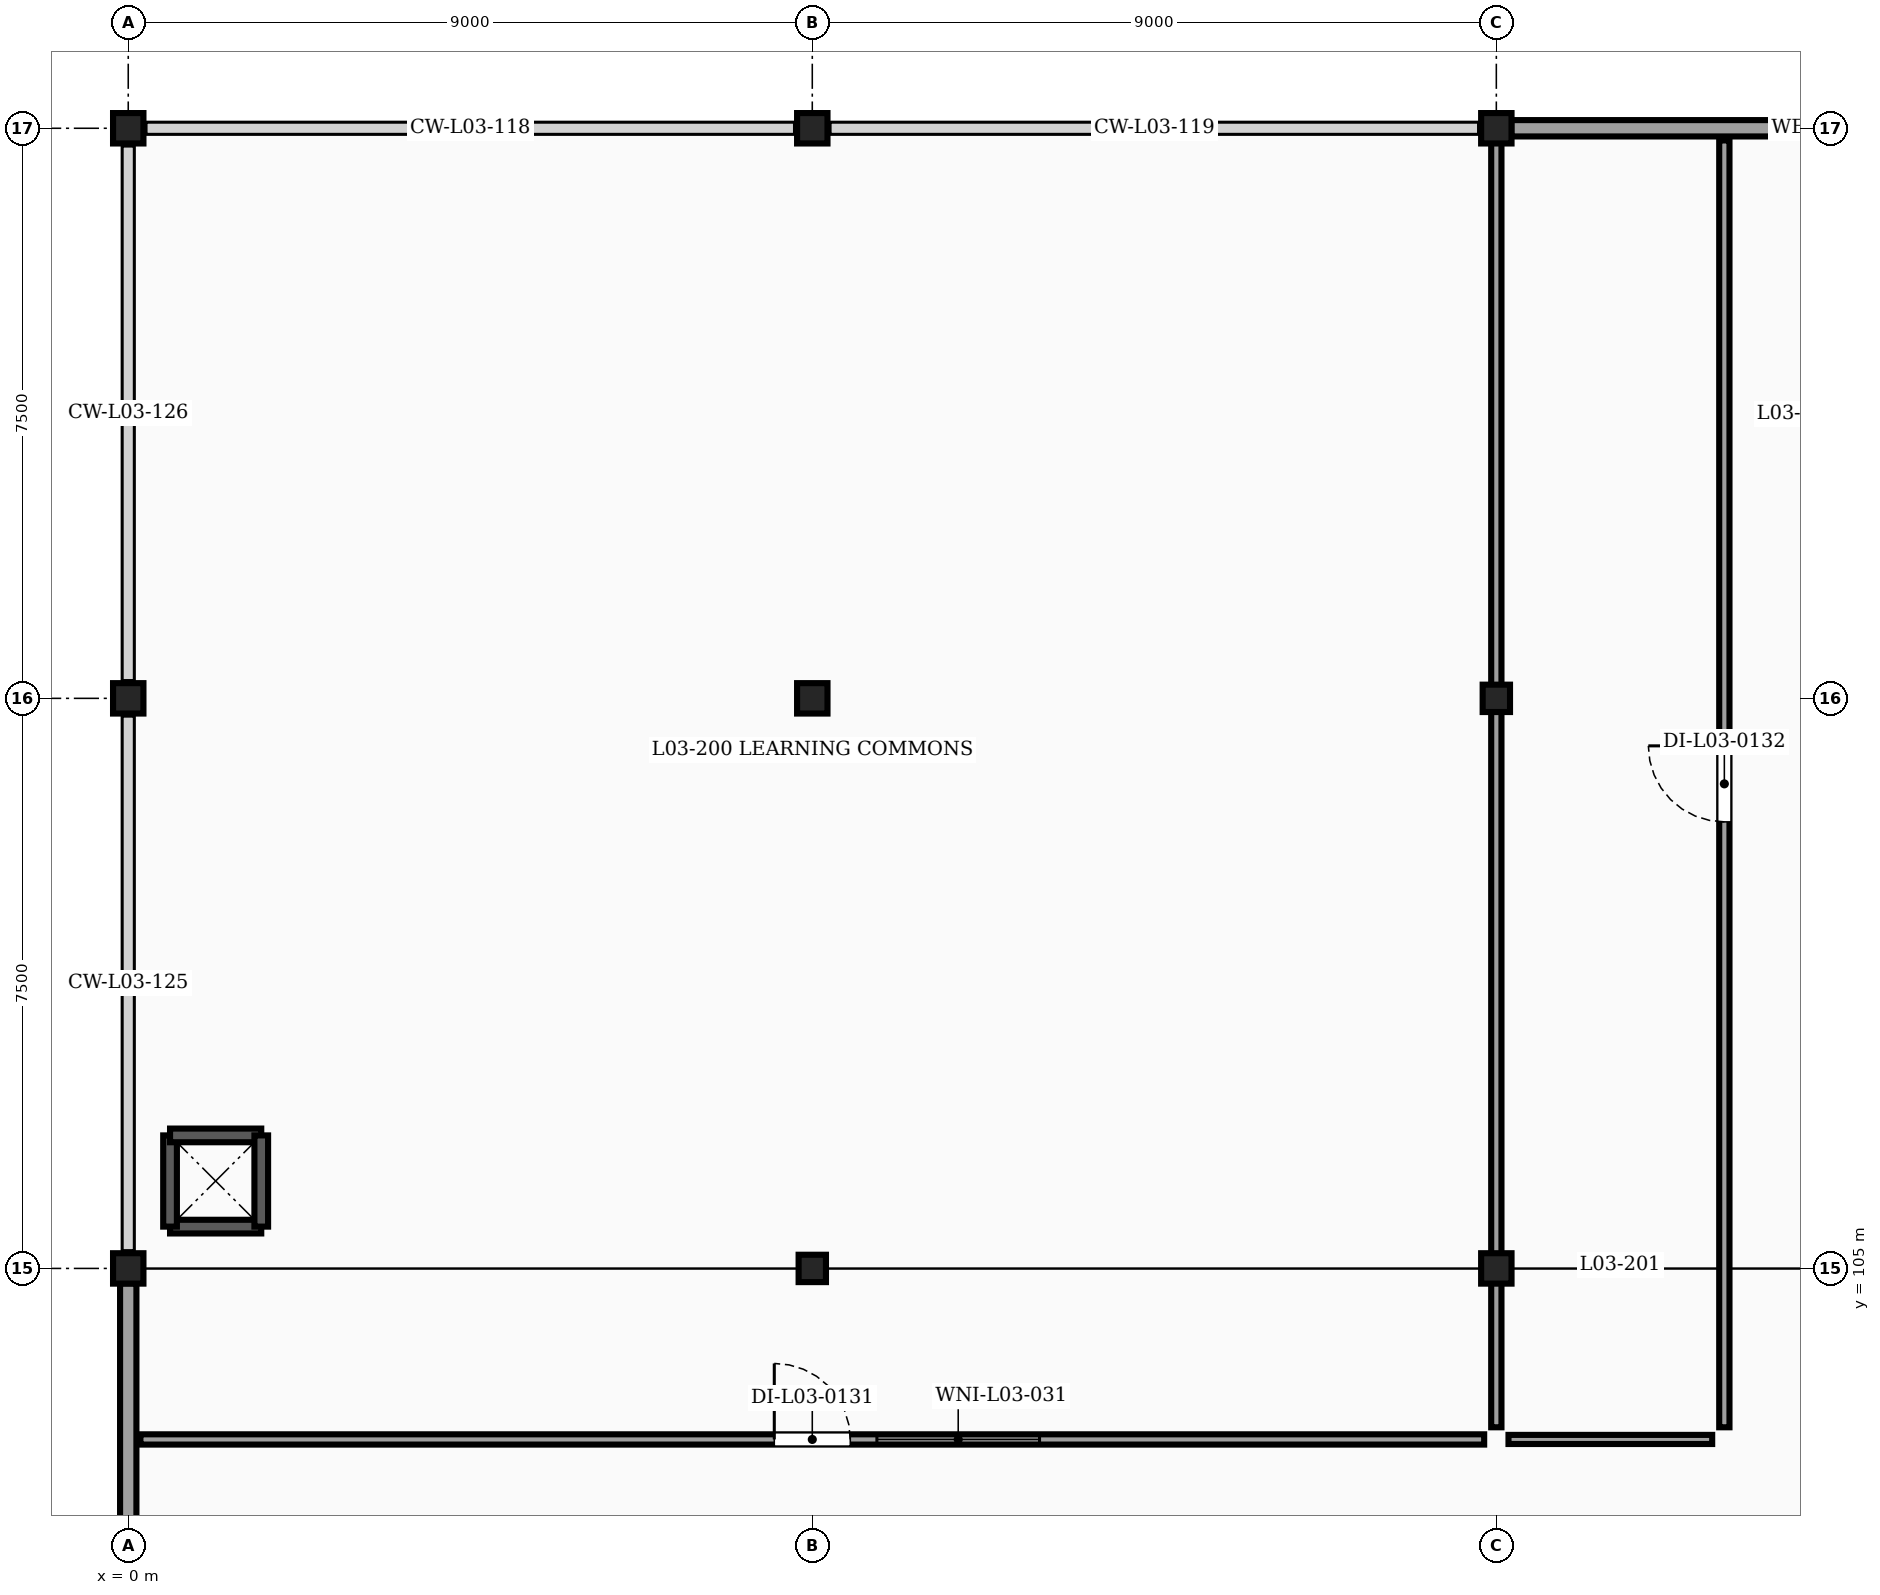
"""IFC4 building model, lengths in metres.
Left out: names, types, materials, properties, quantities, classifications, styles, units other than length and angle.
Written with IfcOpenShell. Run it as: python <this file> out.ifc"""

import sys

from ifc_helpers import new_model, si_unit, direction, frame, frame_2d, origin, origin_2d, place, context, subcontext, project, spatial, rectangle, extrude, element, fill, save


model = new_model("IFC4")
c1 = context("Model", 3, precision=1e-05, world=origin(), true_north=direction((0.0, 1.0)))
c2 = subcontext(c1, "Body", "Model", "MODEL_VIEW")
j1 = project(units=[si_unit("LENGTHUNIT", "METRE"), si_unit("PLANEANGLEUNIT", "RADIAN")], contexts=[c1])
p1 = place(None, origin())
s1 = spatial("IfcSite", under=j1, at=p1, CompositionType="ELEMENT")
p2 = place(p1, origin())
s2 = spatial("IfcBuilding", under=s1, at=p2, CompositionType="ELEMENT")
p3 = place(p2, frame((0.0, 0.0, 12.3)))
s3 = spatial("IfcBuildingStorey", under=s2, at=p3, CompositionType="ELEMENT", Elevation=12.3)
p4 = place(p3, frame((0.0, 105.0, 0.0), z_axis=(0.0, 0.0, 1.0), x_axis=(1.0, 0.0, 0.0)))
e1 = element("IfcColumn", 1, at=p4, inside=s3, PredefinedType="COLUMN", context=c2, shape_type="SweptSolid", body=[
    extrude(rectangle(XDim=0.4, YDim=0.4, at=origin_2d()), origin(), (0.0, 0.0, 1.0), 3.65),
])
p5 = place(p3, frame((9.0, 105.0, 0.0), z_axis=(0.0, 0.0, 1.0), x_axis=(1.0, 0.0, 0.0)))
e2 = element("IfcColumn", 2, at=p5, inside=s3, PredefinedType="COLUMN", context=c2, shape_type="SweptSolid", body=[
    extrude(rectangle(XDim=0.36, YDim=0.36, at=origin_2d()), origin(), (0.0, 0.0, 1.0), 3.65),
])
for number, where, z_axis, x_axis in (
    (3, (18.0, 105.0, 0.0), (0.0, 0.0, 1.0), (1.0, 0.0, 0.0)),
    (4, (0.0, 112.5, 0.0), (0.0, 0.0, 1.0), (1.0, 0.0, 0.0)),
    (5, (9.0, 112.5, 0.0), (0.0, 0.0, 1.0), (1.0, 0.0, 0.0)),
):
    element("IfcColumn", number, at=place(p3, frame(where, z_axis=z_axis, x_axis=x_axis)), inside=s3, PredefinedType="COLUMN", context=c2, shape_type="SweptSolid", body=[
        extrude(rectangle(XDim=0.4, YDim=0.4, at=origin_2d()), origin(), (0.0, 0.0, 1.0), 3.65),
    ])
p6 = place(p3, frame((18.0, 112.5, 0.0), z_axis=(0.0, 0.0, 1.0), x_axis=(1.0, 0.0, 0.0)))
e6 = element("IfcColumn", 6, at=p6, inside=s3, PredefinedType="COLUMN", context=c2, shape_type="SweptSolid", body=[
    extrude(rectangle(XDim=0.36, YDim=0.36, at=origin_2d()), origin(), (0.0, 0.0, 1.0), 3.65),
])
for number, where, z_axis, x_axis in (
    (7, (0.0, 120.0, 0.0), (0.0, 0.0, 1.0), (1.0, 0.0, 0.0)),
    (8, (9.0, 120.0, 0.0), (0.0, 0.0, 1.0), (1.0, 0.0, 0.0)),
    (9, (18.0, 120.0, 0.0), (0.0, 0.0, 1.0), (1.0, 0.0, 0.0)),
):
    element("IfcColumn", number, at=place(p3, frame(where, z_axis=z_axis, x_axis=x_axis)), inside=s3, PredefinedType="COLUMN", context=c2, shape_type="SweptSolid", body=[
        extrude(rectangle(XDim=0.4, YDim=0.4, at=origin_2d()), origin(), (0.0, 0.0, 1.0), 3.65),
    ])
p7 = place(p3, frame((18.196, 120.0, 0.0), z_axis=(0.0, 0.0, 1.0), x_axis=(1.0, 0.0, 0.0)))
e10 = element("IfcWall", 10, at=p7, inside=s3, PredefinedType="SOLIDWALL", context=c2, shape_type="SweptSolid", body=[
    extrude(rectangle(XDim=8.608, YDim=0.215, at=frame_2d((4.304, 0.0))), origin(), (0.0, 0.0, 1.0), 3.057),
])
p8 = place(p3, frame((0.0, 97.696, 0.0), z_axis=(0.0, 0.0, 1.0), x_axis=(0.0, 1.0, 0.0)))
e11 = element("IfcWall", 11, at=p8, inside=s3, PredefinedType="SOLIDWALL", context=c2, shape_type="SweptSolid", body=[
    extrude(rectangle(XDim=7.108, YDim=0.215, at=frame_2d((3.554, 0.0))), origin(), (0.0, 0.0, 1.0), 3.057),
])
for number, where, z_axis, x_axis in (
    (12, (1.75, 105.55, 0.0), (0.0, 0.0, 1.0), (-1.0, 0.0, 0.0)),
    (13, (0.55, 105.55, 0.0), (0.0, 0.0, 1.0), (0.0, 1.0, 0.0)),
    (14, (0.55, 106.75, 0.0), (0.0, 0.0, 1.0), (1.0, 0.0, 0.0)),
    (15, (1.75, 106.75, 0.0), (0.0, 0.0, 1.0), (0.0, -1.0, 0.0)),
):
    element("IfcWall", number, at=place(p3, frame(where, z_axis=z_axis, x_axis=x_axis)), inside=s3, PredefinedType="SHEAR", context=c2, shape_type="SweptSolid", body=[
        extrude(rectangle(XDim=1.2, YDim=0.18, at=frame_2d((0.6, 0.0))), origin(), (0.0, 0.0, 1.0), 3.65),
    ])
p9 = place(p3, frame((0.16, 102.75, 0.0), z_axis=(0.0, 0.0, 1.0), x_axis=(1.0, 0.0, 0.0)))
e16 = element("IfcWall", 16, at=p9, inside=s3, PredefinedType="PARTITIONING", context=c2, shape_type="SweptSolid", body=[
    extrude(rectangle(XDim=17.68, YDim=0.135, at=frame_2d((8.84, 0.0))), origin(), (0.0, 0.0, 1.0), 3.65),
])
p10 = place(p9, frame((8.34, 0.0, 0.0)))
e17 = element("IfcOpeningElement", 17, at=p10, cuts=e16, PredefinedType="OPENING", context=c2, shape_type="SweptSolid", body=[
    extrude(rectangle(XDim=1.0, YDim=2.15, at=frame_2d((0.5, 1.075))), frame((0.0, 0.077, 0.0), z_axis=(0.0, -1.0, 0.0), x_axis=(1.0, 0.0, 0.0)), (0.0, 0.0, 1.0), 0.155),
])
p11 = place(p9, frame((9.69, 0.0, 1.02)))
e18 = element("IfcOpeningElement", 18, at=p11, cuts=e16, PredefinedType="OPENING", context=c2, shape_type="SweptSolid", body=[
    extrude(rectangle(XDim=2.14, YDim=1.22, at=frame_2d((1.07, 0.61))), frame((0.0, 0.077, 0.0), z_axis=(0.0, -1.0, 0.0), x_axis=(1.0, 0.0, 0.0)), (0.0, 0.0, 1.0), 0.155),
])
p12 = place(p3, frame((18.16, 102.75, 0.0), z_axis=(0.0, 0.0, 1.0), x_axis=(1.0, 0.0, 0.0)))
e19 = element("IfcWall", 19, at=p12, inside=s3, PredefinedType="PARTITIONING", context=c2, shape_type="SweptSolid", body=[
    extrude(rectangle(XDim=2.68, YDim=0.12, at=frame_2d((1.34, 0.0))), origin(), (0.0, 0.0, 1.0), 3.65),
])
p13 = place(p3, frame((21.0, 102.91, 0.0), z_axis=(0.0, 0.0, 1.0), x_axis=(0.0, 1.0, 0.0)))
e20 = element("IfcWall", 20, at=p13, inside=s3, PredefinedType="PARTITIONING", context=c2, shape_type="SweptSolid", body=[
    extrude(rectangle(XDim=16.93, YDim=0.135, at=frame_2d((8.465, 0.0))), origin(), (0.0, 0.0, 1.0), 3.342),
])
p14 = place(p13, frame((7.965, 0.0, 0.0)))
e21 = element("IfcOpeningElement", 21, at=p14, cuts=e20, PredefinedType="OPENING", context=c2, shape_type="SweptSolid", body=[
    extrude(rectangle(XDim=1.0, YDim=2.15, at=frame_2d((0.5, 1.075))), frame((0.0, 0.077, 0.0), z_axis=(0.0, -1.0, 0.0), x_axis=(1.0, 0.0, 0.0)), (0.0, 0.0, 1.0), 0.155),
])
p15 = place(p3, frame((18.0, 102.91, 0.0), z_axis=(0.0, 0.0, 1.0), x_axis=(0.0, 1.0, 0.0)))
e22 = element("IfcWall", 22, at=p15, inside=s3, PredefinedType="PARTITIONING", context=c2, shape_type="SweptSolid", body=[
    extrude(rectangle(XDim=16.93, YDim=0.135, at=frame_2d((8.465, 0.0))), origin(), (0.0, 0.0, 1.0), 3.192),
])
p16 = place(p10, origin())
e23 = element("IfcDoor", 23, at=p16, inside=s3, OperationType="SINGLE_SWING_LEFT", PredefinedType="DOOR", context=c2, shape_type="SweptSolid", body=[
    extrude(rectangle(XDim=1.0, YDim=2.15, at=frame_2d((0.5, 1.075))), frame((0.0, 0.025, 0.0), z_axis=(0.0, -1.0, 0.0), x_axis=(1.0, 0.0, 0.0)), (0.0, 0.0, 1.0), 0.05),
])
fill(e17, e23)
p17 = place(p11, origin())
e24 = element("IfcWindow", 24, at=p17, inside=s3, PartitioningType="DOUBLE_PANEL_VERTICAL", PredefinedType="WINDOW", context=c2, shape_type="SweptSolid", body=[
    extrude(rectangle(XDim=2.14, YDim=1.22, at=frame_2d((1.07, 0.61))), frame((0.0, 0.03, 0.0), z_axis=(0.0, -1.0, 0.0), x_axis=(1.0, 0.0, 0.0)), (0.0, 0.0, 1.0), 0.06),
])
fill(e18, e24)
p18 = place(p14, origin())
e25 = element("IfcDoor", 25, at=p18, inside=s3, OperationType="SINGLE_SWING_RIGHT", PredefinedType="DOOR", context=c2, shape_type="SweptSolid", body=[
    extrude(rectangle(XDim=1.0, YDim=2.15, at=frame_2d((0.5, 1.075))), frame((0.0, 0.025, 0.0), z_axis=(0.0, -1.0, 0.0), x_axis=(1.0, 0.0, 0.0)), (0.0, 0.0, 1.0), 0.05),
])
fill(e21, e25)
save(model, sys.argv[1])
